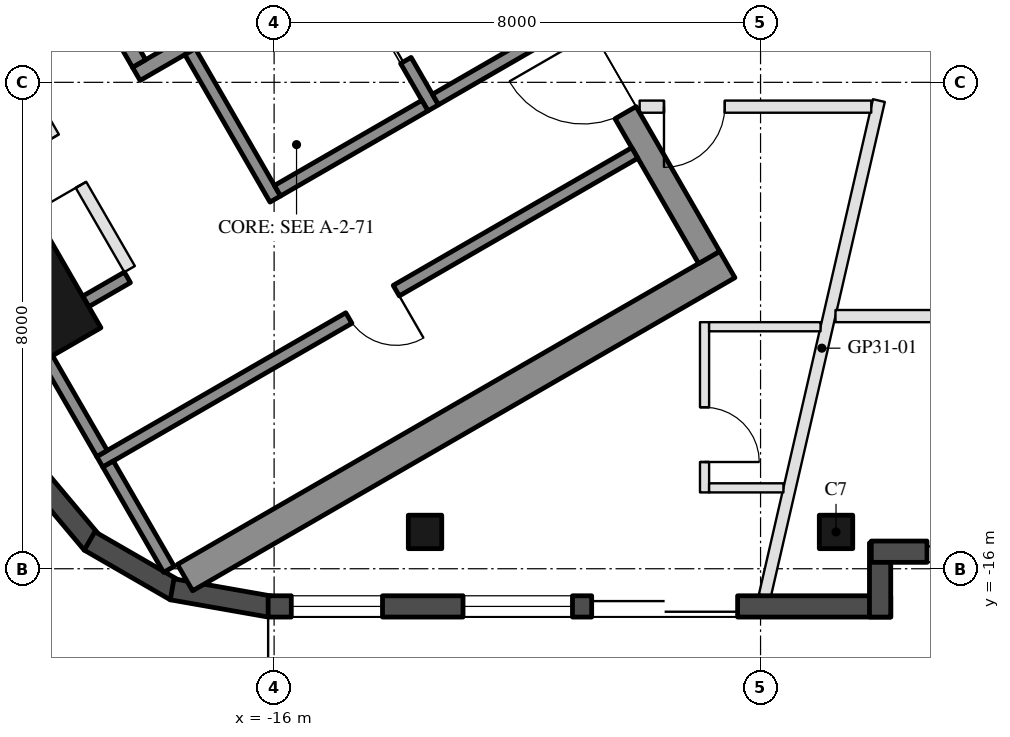
"""IFC4 building model, lengths in metres.
Left out: names, types, materials, properties, quantities, classifications, styles, units other than length and angle.
Written with IfcOpenShell. Run it as: python <this file> out.ifc"""

import sys

from ifc_helpers import new_model, si_unit, direction, frame, frame_2d, origin, origin_2d, place, context, subcontext, project, spatial, rectangle, hollow_rectangle, extrude, boolean, halfspace, element, fill, save


model = new_model("IFC4")
c1 = context("Model", 3, precision=1e-05, world=origin(), true_north=direction((0.0, 1.0)))
c2 = subcontext(c1, "Body", "Model", "MODEL_VIEW")
j1 = project(units=[si_unit("LENGTHUNIT", "METRE"), si_unit("PLANEANGLEUNIT", "RADIAN")], contexts=[c1])
p1 = place(None, origin())
s1 = spatial("IfcSite", under=j1, at=p1, CompositionType="ELEMENT")
p2 = place(p1, origin())
s2 = spatial("IfcBuilding", under=s1, at=p2, CompositionType="ELEMENT")
p3 = place(p2, frame((0.0, 0.0, 305.9)))
s3 = spatial("IfcBuildingStorey", under=s2, at=p3, CompositionType="ELEMENT", Elevation=305.9)
p4 = place(p3, frame((-13.518, -15.395, 0.0), z_axis=(0.0, 0.0, 1.0), x_axis=(-1.0, 0.0, 0.0)))
e1 = element("IfcColumn", 1, at=p4, inside=s3, PredefinedType="COLUMN", context=c2, shape_type="SweptSolid", body=[
    boolean("DIFFERENCE", extrude(hollow_rectangle(XDim=0.55, YDim=0.55, WallThickness=0.025, at=origin_2d()), origin(), (0.0, 0.0, 1.0), 3.7), halfspace(frame((0.0, 0.0, 3.66), z_axis=(0.0, 0.0, 1.0), x_axis=(1.0, 0.0, 0.0)), False)),
])
p5 = place(p3, frame((-6.759, -15.395, 0.0), z_axis=(0.0, 0.0, 1.0), x_axis=(-1.0, 0.0, 0.0)))
e2 = element("IfcColumn", 2, at=p5, inside=s3, PredefinedType="COLUMN", context=c2, shape_type="SweptSolid", body=[
    boolean("DIFFERENCE", extrude(hollow_rectangle(XDim=0.55, YDim=0.55, WallThickness=0.025, at=origin_2d()), origin(), (0.0, 0.0, 1.0), 3.7), halfspace(frame((0.0, 0.0, 3.666), z_axis=(0.0, 0.0, 1.0), x_axis=(1.0, 0.0, 0.0)), False)),
])
p6 = place(p3, frame((-20.214, -11.671, 0.0), z_axis=(0.0, 0.0, 1.0), x_axis=(-0.5, 0.866025403784, 0.0)))
e3 = element("IfcColumn", 3, at=p6, inside=s3, PredefinedType="COLUMN", context=c2, shape_type="SweptSolid", body=[
    boolean("DIFFERENCE", extrude(hollow_rectangle(XDim=2.0, YDim=2.0, WallThickness=0.05, at=origin_2d()), origin(), (0.0, 0.0, 1.0), 3.7), halfspace(frame((0.0, 0.0, 3.587), z_axis=(0.0, 0.0, 1.0), x_axis=(1.0, 0.0, 0.0)), False)),
])
p7 = place(p3, frame((-20.039, -14.329, 0.0), z_axis=(0.0, 0.0, 1.0), x_axis=(0.642708448155, -0.766110860562, 0.0)))
e4 = element("IfcWall", 4, at=p7, inside=s3, PredefinedType="SOLIDWALL", context=c2, shape_type="SweptSolid", body=[
    extrude(rectangle(XDim=1.634, YDim=0.35, at=frame_2d((0.817, 0.0))), origin(), (0.0, 0.0, 1.0), 3.55),
])
p8 = place(p3, frame((-19.035, -15.542, 0.0), z_axis=(0.0, 0.0, 1.0), x_axis=(0.866083589932, -0.499899205091, 0.0)))
e5 = element("IfcWall", 5, at=p8, inside=s3, PredefinedType="SOLIDWALL", context=c2, shape_type="SweptSolid", body=[
    extrude(rectangle(XDim=1.634, YDim=0.35, at=frame_2d((0.817, 0.0))), origin(), (0.0, 0.0, 1.0), 3.55),
])
p9 = place(p3, frame((-17.677, -16.338, 0.0), z_axis=(0.0, 0.0, 1.0), x_axis=(0.98479107762, -0.173742721977, 0.0)))
e6 = element("IfcWall", 6, at=p9, inside=s3, PredefinedType="SOLIDWALL", context=c2, shape_type="SweptSolid", body=[
    extrude(rectangle(XDim=1.634, YDim=0.35, at=frame_2d((0.817, 0.0))), origin(), (0.0, 0.0, 1.0), 3.55),
])
p10 = place(p3, frame((-16.098, -16.62, 0.0), z_axis=(0.0, 0.0, 1.0), x_axis=(1.0, 0.0, 0.0)))
e7 = element("IfcWall", 7, at=p10, inside=s3, PredefinedType="SOLIDWALL", context=c2, shape_type="SweptSolid", body=[
    extrude(rectangle(XDim=10.239, YDim=0.35, at=frame_2d((5.12, 0.0))), origin(), (0.0, 0.0, 1.0), 3.55),
])
p11 = place(p10, frame((0.381, 0.0, 0.3)))
e8 = element("IfcOpeningElement", 8, at=p11, cuts=e7, PredefinedType="OPENING", context=c2, shape_type="SweptSolid", body=[
    extrude(rectangle(XDim=1.5, YDim=2.65, at=frame_2d((0.75, 1.325))), frame((0.0, 0.185, 0.0), z_axis=(0.0, -1.0, 0.0), x_axis=(1.0, 0.0, 0.0)), (0.0, 0.0, 1.0), 0.37),
])
p12 = place(p10, frame((5.321, 0.0, 0.0)))
e9 = element("IfcOpeningElement", 9, at=p12, cuts=e7, PredefinedType="OPENING", context=c2, shape_type="SweptSolid", body=[
    extrude(rectangle(XDim=2.4, YDim=2.4, at=frame_2d((1.2, 1.2))), frame((0.0, 0.185, 0.0), z_axis=(0.0, -1.0, 0.0), x_axis=(1.0, 0.0, 0.0)), (0.0, 0.0, 1.0), 0.37),
])
p13 = place(p10, frame((3.205, 0.0, 0.3)))
e10 = element("IfcOpeningElement", 10, at=p13, cuts=e7, PredefinedType="OPENING", context=c2, shape_type="SweptSolid", body=[
    extrude(rectangle(XDim=1.8, YDim=2.65, at=frame_2d((0.9, 1.325))), frame((0.0, 0.185, 0.0), z_axis=(0.0, -1.0, 0.0), x_axis=(1.0, 0.0, 0.0)), (0.0, 0.0, 1.0), 0.37),
])
p14 = place(p3, frame((-6.034, -16.795, 0.0), z_axis=(0.0, 0.0, 1.0), x_axis=(0.0, 1.0, 0.0)))
e11 = element("IfcWall", 11, at=p14, inside=s3, PredefinedType="SOLIDWALL", context=c2, shape_type="SweptSolid", body=[
    extrude(rectangle(XDim=1.22, YDim=0.35, at=frame_2d((0.61, 0.0))), origin(), (0.0, 0.0, 1.0), 3.55),
])
p15 = place(p3, frame((-6.179, -15.719, 0.0), z_axis=(0.0, 0.0, 1.0), x_axis=(1.0, 0.0, 0.0)))
e12 = element("IfcWall", 12, at=p15, inside=s3, PredefinedType="SOLIDWALL", context=c2, shape_type="SweptSolid", body=[
    extrude(rectangle(XDim=5.599, YDim=0.35, at=frame_2d((2.799, 0.0))), origin(), (0.0, 0.0, 1.0), 3.55),
])
p16 = place(p15, frame((0.916, 0.0, 0.0)))
e13 = element("IfcOpeningElement", 13, at=p16, cuts=e12, PredefinedType="OPENING", context=c2, shape_type="SweptSolid", body=[
    extrude(rectangle(XDim=2.4, YDim=2.4, at=frame_2d((1.2, 1.2))), frame((0.0, 0.185, 0.0), z_axis=(0.0, -1.0, 0.0), x_axis=(1.0, 0.0, 0.0)), (0.0, 0.0, 1.0), 0.37),
])
p17 = place(p3, frame((-8.547, -10.997, 0.0), z_axis=(0.0, 0.0, 1.0), x_axis=(-0.866027279078, -0.499996751883, 0.0)))
e14 = element("IfcWall", 14, at=p17, inside=s3, PredefinedType="SHEAR", context=c2, shape_type="SweptSolid", body=[
    extrude(rectangle(XDim=10.298, YDim=0.5, at=frame_2d((5.149, 0.0))), origin(), (0.0, 0.0, 1.0), 3.5),
])
p18 = place(p3, frame((-13.845, -2.22, 0.0), z_axis=(0.0, 0.0, 1.0), x_axis=(0.500004234368, -0.866022959057, 0.0)))
e15 = element("IfcWall", 15, at=p18, inside=s3, PredefinedType="SHEAR", context=c2, shape_type="SweptSolid", body=[
    extrude(rectangle(XDim=10.0, YDim=0.4, at=frame_2d((5.0, 0.0))), origin(), (0.0, 0.0, 1.0), 3.5),
])
p19 = place(p18, frame((3.55, 0.0, 0.0)))
e16 = element("IfcOpeningElement", 16, at=p19, cuts=e15, PredefinedType="OPENING", context=c2, shape_type="SweptSolid", body=[
    extrude(rectangle(XDim=1.1, YDim=2.1, at=frame_2d((0.55, 1.05))), frame((0.0, 0.21, 0.0), z_axis=(0.0, -1.0, 0.0), x_axis=(1.0, 0.0, 0.0)), (0.0, 0.0, 1.0), 0.42),
])
p20 = place(p18, frame((5.85, 0.0, 0.0)))
e17 = element("IfcOpeningElement", 17, at=p20, cuts=e15, PredefinedType="OPENING", context=c2, shape_type="SweptSolid", body=[
    extrude(rectangle(XDim=1.4, YDim=2.1, at=frame_2d((0.7, 1.05))), frame((0.0, 0.21, 0.0), z_axis=(0.0, -1.0, 0.0), x_axis=(1.0, 0.0, 0.0)), (0.0, 0.0, 1.0), 0.42),
])
p21 = place(p3, frame((-12.681, -4.636, 0.0), z_axis=(0.0, 0.0, 1.0), x_axis=(-0.866021702275, -0.500006411147, 0.0)))
e18 = element("IfcWall", 18, at=p21, inside=s3, PredefinedType="SHEAR", context=c2, shape_type="SweptSolid", body=[
    extrude(rectangle(XDim=6.45, YDim=0.25, at=frame_2d((3.225, 0.0))), origin(), (0.0, 0.0, 1.0), 3.5),
])
p22 = place(p21, frame((0.3, 0.0, 0.0)))
e19 = element("IfcOpeningElement", 19, at=p22, cuts=e18, PredefinedType="OPENING", context=c2, shape_type="SweptSolid", body=[
    extrude(rectangle(XDim=1.0, YDim=2.1, at=frame_2d((0.5, 1.05))), frame((0.0, 0.135, 0.0), z_axis=(0.0, -1.0, 0.0), x_axis=(1.0, 0.0, 0.0)), (0.0, 0.0, 1.0), 0.27),
])
p23 = place(p3, frame((-19.496, -5.482, 0.0), z_axis=(0.0, 0.0, 1.0), x_axis=(0.499990435942, -0.866030925526, 0.0)))
e20 = element("IfcWall", 20, at=p23, inside=s3, PredefinedType="SHEAR", context=c2, shape_type="SweptSolid", body=[
    extrude(rectangle(XDim=2.55, YDim=0.25, at=frame_2d((1.275, 0.0))), origin(), (0.0, 0.0, 1.0), 3.5),
])
p24 = place(p3, frame((-17.381, -7.495, 0.0), z_axis=(0.0, 0.0, 1.0), x_axis=(0.500011755427, -0.866018616679, 0.0)))
e21 = element("IfcWall", 21, at=p24, inside=s3, PredefinedType="SHEAR", context=c2, shape_type="SweptSolid", body=[
    extrude(rectangle(XDim=2.8, YDim=0.2, at=frame_2d((1.4, 0.0))), origin(), (0.0, 0.0, 1.0), 3.5),
])
p25 = place(p3, frame((-14.783, -5.995, 0.0), z_axis=(0.0, 0.0, 1.0), x_axis=(0.49994636267, -0.866056369097, 0.0)))
e22 = element("IfcWall", 22, at=p25, inside=s3, PredefinedType="SHEAR", context=c2, shape_type="SweptSolid", body=[
    extrude(rectangle(XDim=2.8, YDim=0.2, at=frame_2d((1.4, 0.0))), origin(), (0.0, 0.0, 1.0), 3.5),
])
p26 = place(p25, frame((0.7, 0.0, 0.0)))
e23 = element("IfcOpeningElement", 23, at=p26, cuts=e22, PredefinedType="OPENING", context=c2, shape_type="SweptSolid", body=[
    extrude(rectangle(XDim=1.2, YDim=2.1, at=frame_2d((0.6, 1.05))), frame((0.0, 0.11, 0.0), z_axis=(0.0, -1.0, 0.0), x_axis=(1.0, 0.0, 0.0)), (0.0, 0.0, 1.0), 0.22),
])
p27 = place(p3, frame((-13.52, -8.383, 0.0), z_axis=(0.0, 0.0, 1.0), x_axis=(-0.866034573852, -0.49998411664, 0.0)))
e24 = element("IfcWall", 24, at=p27, inside=s3, PredefinedType="SHEAR", context=c2, shape_type="SweptSolid", body=[
    extrude(rectangle(XDim=2.8, YDim=0.2, at=frame_2d((1.4, 0.0))), origin(), (0.0, 0.0, 1.0), 3.5),
])
p28 = place(p3, frame((-11.268, -7.083, 0.0), z_axis=(0.0, 0.0, 1.0), x_axis=(-0.866050077142, -0.499957262057, 0.0)))
e25 = element("IfcWall", 25, at=p28, inside=s3, PredefinedType="SHEAR", context=c2, shape_type="SweptSolid", body=[
    extrude(rectangle(XDim=2.4, YDim=0.2, at=frame_2d((1.2, 0.0))), origin(), (0.0, 0.0, 1.0), 3.5),
])
p29 = place(p3, frame((-10.068, -9.162, 0.0), z_axis=(0.0, 0.0, 1.0), x_axis=(-0.866032725843, -0.499987317609, 0.0)))
e26 = element("IfcWall", 26, at=p29, inside=s3, PredefinedType="SHEAR", context=c2, shape_type="SweptSolid", body=[
    extrude(rectangle(XDim=10.16, YDim=0.2, at=frame_2d((5.08, 0.0))), origin(), (0.0, 0.0, 1.0), 3.5),
])
p30 = place(p29, frame((4.53, 0.0, 0.0)))
e27 = element("IfcOpeningElement", 27, at=p30, cuts=e26, PredefinedType="OPENING", context=c2, shape_type="SweptSolid", body=[
    extrude(rectangle(XDim=0.9, YDim=2.1, at=frame_2d((0.45, 1.05))), frame((0.0, 0.11, 0.0), z_axis=(0.0, -1.0, 0.0), x_axis=(1.0, 0.0, 0.0)), (0.0, 0.0, 1.0), 0.22),
])
p31 = place(p3, frame((-19.73, -12.546, 0.0), z_axis=(0.0, 0.0, 1.0), x_axis=(0.500004188491, -0.866022985545, 0.0)))
e28 = element("IfcWall", 28, at=p31, inside=s3, PredefinedType="SHEAR", context=c2, shape_type="SweptSolid", body=[
    extrude(rectangle(XDim=1.8, YDim=0.2, at=frame_2d((0.9, 0.0))), origin(), (0.0, 0.0, 1.0), 3.5),
])
p32 = place(p3, frame((-18.413, -11.208, 0.0), z_axis=(0.0, 0.0, 1.0), x_axis=(-0.86597493103, -0.500087411186, 0.0)))
e29 = element("IfcWall", 29, at=p32, inside=s3, PredefinedType="SHEAR", context=c2, shape_type="SweptSolid", body=[
    extrude(rectangle(XDim=0.791, YDim=0.2, at=frame_2d((0.396, 0.0))), origin(), (0.0, 0.0, 1.0), 3.5),
])
p33 = place(p3, frame((-18.73, -14.278, 0.0), z_axis=(0.0, 0.0, 1.0), x_axis=(0.50002537861, -0.866010750942, 0.0)))
e30 = element("IfcWall", 30, at=p33, inside=s3, PredefinedType="SHEAR", context=c2, shape_type="SweptSolid", body=[
    extrude(rectangle(XDim=2.0, YDim=0.2, at=frame_2d((1.0, 0.0))), origin(), (0.0, 0.0, 1.0), 3.5),
])
p34 = place(p3, frame((-21.076, -6.395, 0.0), z_axis=(0.0, 0.0, 1.0), x_axis=(0.50001468107, -0.866016927499, 0.0)))
e31 = element("IfcWall", 31, at=p34, inside=s3, PredefinedType="PARTITIONING", context=c2, shape_type="SweptSolid", body=[
    extrude(rectangle(XDim=5.4, YDim=0.2, at=frame_2d((2.7, 0.0))), origin(), (0.0, 0.0, 1.0), 3.5),
])
p35 = place(p34, frame((2.9, 0.0, 0.0)))
e32 = element("IfcOpeningElement", 32, at=p35, cuts=e31, PredefinedType="OPENING", context=c2, shape_type="SweptSolid", body=[
    extrude(rectangle(XDim=0.9, YDim=2.1, at=frame_2d((0.45, 1.05))), frame((0.0, 0.11, 0.0), z_axis=(0.0, -1.0, 0.0), x_axis=(1.0, 0.0, 0.0)), (0.0, 0.0, 1.0), 0.22),
])
p36 = place(p3, frame((-18.866, -6.822, 0.0), z_axis=(0.0, 0.0, 1.0), x_axis=(-0.866028054938, -0.499995408039, 0.0)))
e33 = element("IfcWall", 33, at=p36, inside=s3, PredefinedType="PARTITIONING", context=c2, shape_type="SweptSolid", body=[
    extrude(rectangle(XDim=1.6, YDim=0.15, at=frame_2d((0.8, 0.0))), origin(), (0.0, 0.0, 1.0), 3.5),
])
p37 = place(p36, frame((0.35, 0.0, 0.0)))
e34 = element("IfcOpeningElement", 34, at=p37, cuts=e33, PredefinedType="OPENING", context=c2, shape_type="SweptSolid", body=[
    extrude(rectangle(XDim=0.9, YDim=2.1, at=frame_2d((0.45, 1.05))), frame((0.0, 0.085, 0.0), z_axis=(0.0, -1.0, 0.0), x_axis=(1.0, 0.0, 0.0)), (0.0, 0.0, 1.0), 0.17),
])
p38 = place(p3, frame((-7.93, -16.445, 0.0), z_axis=(0.0, 0.0, 1.0), x_axis=(0.224458408835, 0.974483669798, 0.0)))
e35 = element("IfcWall", 35, at=p38, inside=s3, PredefinedType="PARTITIONING", context=c2, shape_type="SweptSolid", body=[
    extrude(rectangle(XDim=8.358, YDim=0.2, at=frame_2d((4.179, 0.0))), origin(), (0.0, 0.0, 1.0), 3.1),
])
p39 = place(p3, frame((-6.18, -8.4, 0.0), z_axis=(0.0, 0.0, 1.0), x_axis=(-1.0, 0.0, 0.0)))
e36 = element("IfcWall", 36, at=p39, inside=s3, PredefinedType="PARTITIONING", context=c2, shape_type="SweptSolid", body=[
    extrude(rectangle(XDim=3.809, YDim=0.2, at=frame_2d((1.904, 0.0))), origin(), (0.0, 0.0, 1.0), 3.1),
])
p40 = place(p39, frame((2.409, 0.0, 0.0)))
e37 = element("IfcOpeningElement", 37, at=p40, cuts=e36, PredefinedType="OPENING", context=c2, shape_type="SweptSolid", body=[
    extrude(rectangle(XDim=1.0, YDim=2.1, at=frame_2d((0.5, 1.05))), frame((0.0, 0.11, 0.0), z_axis=(0.0, -1.0, 0.0), x_axis=(1.0, 0.0, 0.0)), (0.0, 0.0, 1.0), 0.22),
])
p41 = place(p3, frame((-8.921, -11.945, 0.0), z_axis=(0.0, 0.0, 1.0), x_axis=(0.0, -1.0, 0.0)))
e38 = element("IfcWall", 38, at=p41, inside=s3, PredefinedType="PARTITIONING", context=c2, shape_type="SweptSolid", body=[
    extrude(rectangle(XDim=2.8, YDim=0.15, at=frame_2d((1.4, 0.0))), origin(), (0.0, 0.0, 1.0), 3.1),
])
p42 = place(p41, frame((1.4, 0.0, 0.0)))
e39 = element("IfcOpeningElement", 39, at=p42, cuts=e38, PredefinedType="OPENING", context=c2, shape_type="SweptSolid", body=[
    extrude(rectangle(XDim=0.9, YDim=2.1, at=frame_2d((0.45, 1.05))), frame((0.0, 0.085, 0.0), z_axis=(0.0, -1.0, 0.0), x_axis=(1.0, 0.0, 0.0)), (0.0, 0.0, 1.0), 0.17),
])
p43 = place(p3, frame((-8.846, -14.67, 0.0), z_axis=(0.0, 0.0, 1.0), x_axis=(1.0, 0.0, 0.0)))
e40 = element("IfcWall", 40, at=p43, inside=s3, PredefinedType="PARTITIONING", context=c2, shape_type="SweptSolid", body=[
    extrude(rectangle(XDim=1.222, YDim=0.15, at=frame_2d((0.611, 0.0))), origin(), (0.0, 0.0, 1.0), 3.1),
])
p44 = place(p3, frame((-8.846, -12.02, 0.0), z_axis=(0.0, 0.0, 1.0), x_axis=(1.0, 0.0, 0.0)))
e41 = element("IfcWall", 41, at=p44, inside=s3, PredefinedType="PARTITIONING", context=c2, shape_type="SweptSolid", body=[
    extrude(rectangle(XDim=1.833, YDim=0.15, at=frame_2d((0.917, 0.0))), origin(), (0.0, 0.0, 1.0), 3.55),
])
p45 = place(p3, frame((-2.226, -11.844, 0.0), z_axis=(0.0, 0.0, 1.0), x_axis=(-1.0, 0.0, 0.0)))
e42 = element("IfcWall", 42, at=p45, inside=s3, PredefinedType="PARTITIONING", context=c2, shape_type="SweptSolid", body=[
    extrude(rectangle(XDim=4.542, YDim=0.2, at=frame_2d((2.271, 0.0))), origin(), (0.0, 0.0, 1.0), 3.1),
])
p46 = place(p45, frame((1.771, 0.0, 0.0)))
e43 = element("IfcOpeningElement", 43, at=p46, cuts=e42, PredefinedType="OPENING", context=c2, shape_type="SweptSolid", body=[
    extrude(rectangle(XDim=1.0, YDim=2.1, at=frame_2d((0.5, 1.05))), frame((0.0, 0.11, 0.0), z_axis=(0.0, -1.0, 0.0), x_axis=(1.0, 0.0, 0.0)), (0.0, 0.0, 1.0), 0.22),
])
p47 = place(p11, origin())
e44 = element("IfcWindow", 44, at=p47, inside=s3, PartitioningType="SINGLE_PANEL", PredefinedType="WINDOW", context=c2, shape_type="SweptSolid", body=[
    extrude(rectangle(XDim=1.5, YDim=2.65, at=frame_2d((0.75, 1.325))), frame((0.0, 0.03, 0.0), z_axis=(0.0, -1.0, 0.0), x_axis=(1.0, 0.0, 0.0)), (0.0, 0.0, 1.0), 0.06),
])
fill(e8, e44)
p48 = place(p12, frame((2.4, 0.0, 0.0), z_axis=(0.0, 0.0, 1.0), x_axis=(-1.0, 0.0, 0.0)))
e45 = element("IfcDoor", 45, at=p48, inside=s3, OperationType="SLIDING_TO_LEFT", PredefinedType="DOOR", context=c2, shape_type="SweptSolid", body=[
    extrude(rectangle(XDim=2.4, YDim=2.4, at=frame_2d((1.2, 1.2))), frame((0.0, 0.025, 0.0), z_axis=(0.0, -1.0, 0.0), x_axis=(1.0, 0.0, 0.0)), (0.0, 0.0, 1.0), 0.05),
])
fill(e9, e45)
p49 = place(p13, origin())
e46 = element("IfcWindow", 46, at=p49, inside=s3, PartitioningType="SINGLE_PANEL", PredefinedType="WINDOW", context=c2, shape_type="SweptSolid", body=[
    extrude(rectangle(XDim=1.8, YDim=2.65, at=frame_2d((0.9, 1.325))), frame((0.0, 0.03, 0.0), z_axis=(0.0, -1.0, 0.0), x_axis=(1.0, 0.0, 0.0)), (0.0, 0.0, 1.0), 0.06),
])
fill(e10, e46)
p50 = place(p16, frame((2.4, 0.0, 0.0), z_axis=(0.0, 0.0, 1.0), x_axis=(-1.0, 0.0, 0.0)))
e47 = element("IfcDoor", 47, at=p50, inside=s3, OperationType="SLIDING_TO_LEFT", PredefinedType="DOOR", context=c2, shape_type="SweptSolid", body=[
    extrude(rectangle(XDim=2.4, YDim=2.4, at=frame_2d((1.2, 1.2))), frame((0.0, 0.025, 0.0), z_axis=(0.0, -1.0, 0.0), x_axis=(1.0, 0.0, 0.0)), (0.0, 0.0, 1.0), 0.05),
])
fill(e13, e47)
p51 = place(p26, origin())
e48 = element("IfcDoor", 48, at=p51, inside=s3, OperationType="DOUBLE_DOOR_SLIDING", PredefinedType="DOOR", context=c2, shape_type="SweptSolid", body=[
    extrude(rectangle(XDim=1.2, YDim=2.1, at=frame_2d((0.6, 1.05))), frame((0.0, 0.025, 0.0), z_axis=(0.0, -1.0, 0.0), x_axis=(1.0, 0.0, 0.0)), (0.0, 0.0, 1.0), 0.05),
])
fill(e23, e48)
p52 = place(p30, origin())
e49 = element("IfcDoor", 49, at=p52, inside=s3, OperationType="SINGLE_SWING_LEFT", PredefinedType="DOOR", context=c2, shape_type="SweptSolid", body=[
    extrude(rectangle(XDim=0.9, YDim=2.1, at=frame_2d((0.45, 1.05))), frame((0.0, 0.025, 0.0), z_axis=(0.0, -1.0, 0.0), x_axis=(1.0, 0.0, 0.0)), (0.0, 0.0, 1.0), 0.05),
])
fill(e27, e49)
p53 = place(p35, frame((0.9, 0.0, 0.0), z_axis=(0.0, 0.0, 1.0), x_axis=(-1.0, 0.0, 0.0)))
e50 = element("IfcDoor", 50, at=p53, inside=s3, OperationType="SINGLE_SWING_LEFT", PredefinedType="DOOR", context=c2, shape_type="SweptSolid", body=[
    extrude(rectangle(XDim=0.9, YDim=2.1, at=frame_2d((0.45, 1.05))), frame((0.0, 0.025, 0.0), z_axis=(0.0, -1.0, 0.0), x_axis=(1.0, 0.0, 0.0)), (0.0, 0.0, 1.0), 0.05),
])
fill(e32, e50)
p54 = place(p20, frame((1.4, 0.0, 0.0), z_axis=(0.0, 0.0, 1.0), x_axis=(-1.0, 0.0, 0.0)))
e51 = element("IfcDoor", 51, at=p54, inside=s3, OperationType="DOUBLE_DOOR_SINGLE_SWING", PredefinedType="DOOR", context=c2, shape_type="SweptSolid", body=[
    extrude(rectangle(XDim=1.4, YDim=2.1, at=frame_2d((0.7, 1.05))), frame((0.0, 0.025, 0.0), z_axis=(0.0, -1.0, 0.0), x_axis=(1.0, 0.0, 0.0)), (0.0, 0.0, 1.0), 0.05),
])
fill(e17, e51)
p55 = place(p42, origin())
e52 = element("IfcDoor", 52, at=p55, inside=s3, OperationType="SINGLE_SWING_RIGHT", PredefinedType="DOOR", context=c2, shape_type="SweptSolid", body=[
    extrude(rectangle(XDim=0.9, YDim=2.1, at=frame_2d((0.45, 1.05))), frame((0.0, 0.025, 0.0), z_axis=(0.0, -1.0, 0.0), x_axis=(1.0, 0.0, 0.0)), (0.0, 0.0, 1.0), 0.05),
])
fill(e39, e52)
p56 = place(p40, origin())
e53 = element("IfcDoor", 53, at=p56, inside=s3, OperationType="SINGLE_SWING_RIGHT", PredefinedType="DOOR", context=c2, shape_type="SweptSolid", body=[
    extrude(rectangle(XDim=1.0, YDim=2.1, at=frame_2d((0.5, 1.05))), frame((0.0, 0.025, 0.0), z_axis=(0.0, -1.0, 0.0), x_axis=(1.0, 0.0, 0.0)), (0.0, 0.0, 1.0), 0.05),
])
fill(e37, e53)
save(model, sys.argv[1])
